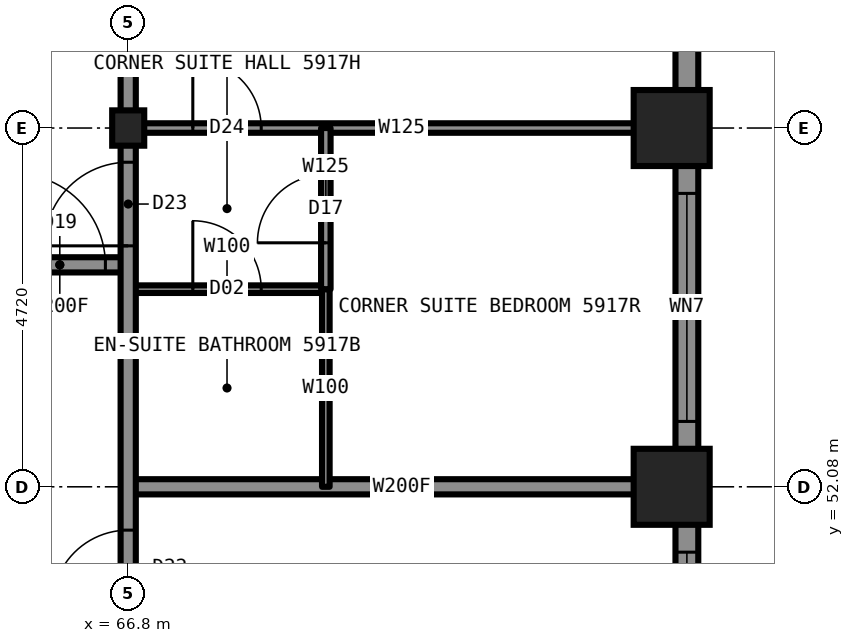
"""IFC4 building model, lengths in metres.
Left out: names, types, materials, properties, quantities, classifications, styles, units other than length and angle.
Written with IfcOpenShell. Run it as: python <this file> out.ifc"""

import sys

from ifc_helpers import new_model, si_unit, direction, frame, frame_2d, origin, origin_2d, place, context, subcontext, project, spatial, rectangle, i_section, extrude, element, fill, save


model = new_model("IFC4")
c1 = context("Model", 3, precision=1e-05, world=origin(), true_north=direction((0.0, 1.0)))
c2 = subcontext(c1, "Body", "Model", "MODEL_VIEW")
j1 = project(units=[si_unit("LENGTHUNIT", "METRE"), si_unit("PLANEANGLEUNIT", "RADIAN")], contexts=[c1])
p1 = place(None, origin())
s1 = spatial("IfcSite", under=j1, at=p1, CompositionType="ELEMENT")
p2 = place(p1, origin())
s2 = spatial("IfcBuilding", under=s1, at=p2, CompositionType="ELEMENT")
p3 = place(p2, frame((0.0, 0.0, 214.3)))
s3 = spatial("IfcBuildingStorey", under=s2, at=p3, CompositionType="ELEMENT", Elevation=214.3)
for number, where, z_axis, x_axis in (
    (1, (73.95, 52.08, 0.0), (0.0, 0.0, 1.0), (1.0, 0.0, 0.0)),
    (2, (73.95, 56.8, 0.0), (0.0, 0.0, 1.0), (1.0, 0.0, 0.0)),
):
    element("IfcColumn", number, at=place(p3, frame(where, z_axis=z_axis, x_axis=x_axis)), inside=s3, PredefinedType="COLUMN", context=c2, shape_type="SweptSolid", body=[
        extrude(i_section(OverallWidth=0.411, OverallDepth=0.434, WebThickness=0.036, FlangeThickness=0.057, at=origin_2d()), origin(), (0.0, 0.0, 1.0), 3.5),
    ])
p4 = place(p3, frame((66.8, 56.8, 0.0), z_axis=(0.0, 0.0, 1.0), x_axis=(1.0, 0.0, 0.0)))
e3 = element("IfcColumn", 3, at=p4, inside=s3, PredefinedType="COLUMN", context=c2, shape_type="SweptSolid", body=[
    extrude(i_section(OverallWidth=0.422, OverallDepth=0.465, WebThickness=0.045, FlangeThickness=0.073, at=origin_2d()), origin(), (0.0, 0.0, 1.0), 3.5),
])
p5 = place(p3, frame((65.0, 55.0, 0.0), z_axis=(0.0, 0.0, 1.0), x_axis=(1.0, 0.0, 0.0)))
e4 = element("IfcWall", 4, at=p5, inside=s3, PredefinedType="PARTITIONING", context=c2, shape_type="SweptSolid", body=[
    extrude(rectangle(XDim=1.8, YDim=0.2, at=frame_2d((0.9, 0.0))), origin(), (0.0, 0.0, 1.0), 3.33),
])
p6 = place(p5, frame((0.3, 0.0, 0.0)))
e5 = element("IfcOpeningElement", 5, at=p6, cuts=e4, PredefinedType="OPENING", context=c2, shape_type="SweptSolid", body=[
    extrude(rectangle(XDim=1.2, YDim=2.2, at=frame_2d((0.6, 1.1))), frame((0.0, 0.11, 0.0), z_axis=(0.0, -1.0, 0.0), x_axis=(1.0, 0.0, 0.0)), (0.0, 0.0, 1.0), 0.22),
])
p7 = place(p3, frame((66.8, 56.8, 0.0), z_axis=(0.0, 0.0, 1.0), x_axis=(1.0, 0.0, 0.0)))
e6 = element("IfcWall", 6, at=p7, inside=s3, PredefinedType="PARTITIONING", context=c2, shape_type="SweptSolid", body=[
    extrude(rectangle(XDim=7.2, YDim=0.125, at=frame_2d((3.6, 0.0))), origin(), (0.0, 0.0, 1.0), 2.573),
])
p8 = place(p7, frame((0.85, 0.0, 0.0)))
e7 = element("IfcOpeningElement", 7, at=p8, cuts=e6, PredefinedType="OPENING", context=c2, shape_type="SweptSolid", body=[
    extrude(rectangle(XDim=0.9, YDim=2.2, at=frame_2d((0.45, 1.1))), frame((0.0, 0.073, 0.0), z_axis=(0.0, -1.0, 0.0), x_axis=(1.0, 0.0, 0.0)), (0.0, 0.0, 1.0), 0.145),
])
p9 = place(p3, frame((66.8, 52.08, 0.0), z_axis=(0.0, 0.0, 1.0), x_axis=(1.0, 0.0, 0.0)))
e8 = element("IfcWall", 8, at=p9, inside=s3, PredefinedType="PARTITIONING", context=c2, shape_type="SweptSolid", body=[
    extrude(rectangle(XDim=7.2, YDim=0.2, at=frame_2d((3.6, 0.0))), origin(), (0.0, 0.0, 1.0), 2.573),
])
p10 = place(p3, frame((66.8, 54.68, 0.0), z_axis=(0.0, 0.0, 1.0), x_axis=(1.0, 0.0, 0.0)))
e9 = element("IfcWall", 9, at=p10, inside=s3, PredefinedType="PARTITIONING", context=c2, shape_type="SweptSolid", body=[
    extrude(rectangle(XDim=2.6, YDim=0.1, at=frame_2d((1.3, 0.0))), origin(), (0.0, 0.0, 1.0), 3.33),
])
p11 = place(p10, frame((0.85, 0.0, 0.0)))
e10 = element("IfcOpeningElement", 10, at=p11, cuts=e9, PredefinedType="OPENING", context=c2, shape_type="SweptSolid", body=[
    extrude(rectangle(XDim=0.9, YDim=2.1, at=frame_2d((0.45, 1.05))), frame((0.0, 0.06, 0.0), z_axis=(0.0, -1.0, 0.0), x_axis=(1.0, 0.0, 0.0)), (0.0, 0.0, 1.0), 0.12),
])
p12 = place(p3, frame((66.8, 33.2, 0.0), z_axis=(0.0, 0.0, 1.0), x_axis=(0.0, 1.0, 0.0)))
e11 = element("IfcWall", 11, at=p12, inside=s3, PredefinedType="PARTITIONING", context=c2, shape_type="SweptSolid", body=[
    extrude(rectangle(XDim=23.58, YDim=0.2, at=frame_2d((11.79, 0.0))), origin(), (0.0, 0.0, 1.0), 3.33),
])
p13 = place(p12, frame((5.12, 0.0, 0.0)))
e12 = element("IfcOpeningElement", 12, at=p13, cuts=e11, PredefinedType="OPENING", context=c2, shape_type="SweptSolid", body=[
    extrude(rectangle(XDim=1.0, YDim=2.2, at=frame_2d((0.5, 1.1))), frame((0.0, 0.11, 0.0), z_axis=(0.0, -1.0, 0.0), x_axis=(1.0, 0.0, 0.0)), (0.0, 0.0, 1.0), 0.22),
])
p14 = place(p12, frame((10.9, 0.0, 0.0)))
e13 = element("IfcOpeningElement", 13, at=p14, cuts=e11, PredefinedType="OPENING", context=c2, shape_type="SweptSolid", body=[
    extrude(rectangle(XDim=1.0, YDim=2.2, at=frame_2d((0.5, 1.1))), frame((0.0, 0.11, 0.0), z_axis=(0.0, -1.0, 0.0), x_axis=(1.0, 0.0, 0.0)), (0.0, 0.0, 1.0), 0.22),
])
p15 = place(p12, frame((17.31, 0.0, 0.0)))
e14 = element("IfcOpeningElement", 14, at=p15, cuts=e11, PredefinedType="OPENING", context=c2, shape_type="SweptSolid", body=[
    extrude(rectangle(XDim=1.0, YDim=2.2, at=frame_2d((0.5, 1.1))), frame((0.0, 0.11, 0.0), z_axis=(0.0, -1.0, 0.0), x_axis=(1.0, 0.0, 0.0)), (0.0, 0.0, 1.0), 0.22),
])
p16 = place(p12, frame((22.05, 0.0, 0.0)))
e15 = element("IfcOpeningElement", 15, at=p16, cuts=e11, PredefinedType="OPENING", context=c2, shape_type="SweptSolid", body=[
    extrude(rectangle(XDim=1.1, YDim=2.2, at=frame_2d((0.55, 1.1))), frame((0.0, 0.11, 0.0), z_axis=(0.0, -1.0, 0.0), x_axis=(1.0, 0.0, 0.0)), (0.0, 0.0, 1.0), 0.22),
])
p17 = place(p12, frame((0.65, 0.0, 0.0)))
e16 = element("IfcOpeningElement", 16, at=p17, cuts=e11, PredefinedType="OPENING", context=c2, shape_type="SweptSolid", body=[
    extrude(rectangle(XDim=1.1, YDim=2.2, at=frame_2d((0.55, 1.1))), frame((0.0, 0.11, 0.0), z_axis=(0.0, -1.0, 0.0), x_axis=(1.0, 0.0, 0.0)), (0.0, 0.0, 1.0), 0.22),
])
p18 = place(p3, frame((69.4, 52.08, 0.0), z_axis=(0.0, 0.0, 1.0), x_axis=(0.0, 1.0, 0.0)))
e17 = element("IfcWall", 17, at=p18, inside=s3, PredefinedType="PARTITIONING", context=c2, shape_type="SweptSolid", body=[
    extrude(rectangle(XDim=2.6, YDim=0.1, at=frame_2d((1.3, 0.0))), origin(), (0.0, 0.0, 1.0), 3.33),
])
p19 = place(p3, frame((69.4, 54.68, 0.0), z_axis=(0.0, 0.0, 1.0), x_axis=(0.0, 1.0, 0.0)))
e18 = element("IfcWall", 18, at=p19, inside=s3, PredefinedType="PARTITIONING", context=c2, shape_type="SweptSolid", body=[
    extrude(rectangle(XDim=2.12, YDim=0.125, at=frame_2d((1.06, 0.0))), origin(), (0.0, 0.0, 1.0), 3.33),
])
p20 = place(p19, frame((0.61, 0.0, 0.0)))
e19 = element("IfcOpeningElement", 19, at=p20, cuts=e18, PredefinedType="OPENING", context=c2, shape_type="SweptSolid", body=[
    extrude(rectangle(XDim=0.9, YDim=2.2, at=frame_2d((0.45, 1.1))), frame((0.0, 0.073, 0.0), z_axis=(0.0, -1.0, 0.0), x_axis=(1.0, 0.0, 0.0)), (0.0, 0.0, 1.0), 0.145),
])
p21 = place(p3, frame((74.15, 31.2, 0.0), z_axis=(0.0, 0.0, 1.0), x_axis=(0.0, 1.0, 0.0)))
e20 = element("IfcWall", 20, at=p21, inside=s3, PredefinedType="SOLIDWALL", context=c2, shape_type="SweptSolid", body=[
    extrude(rectangle(XDim=27.6, YDim=0.3, at=frame_2d((13.8, 0.0))), origin(), (0.0, 0.0, 1.0), 2.63),
])
p22 = place(p21, frame((2.86, 0.0, 0.3)))
e21 = element("IfcOpeningElement", 21, at=p22, cuts=e20, PredefinedType="OPENING", context=c2, shape_type="SweptSolid", body=[
    extrude(rectangle(XDim=3.0, YDim=2.0, at=frame_2d((1.5, 1.0))), frame((0.0, 0.16, 0.0), z_axis=(0.0, -1.0, 0.0), x_axis=(1.0, 0.0, 0.0)), (0.0, 0.0, 1.0), 0.32),
])
p23 = place(p21, frame((7.58, 0.0, 0.3)))
e22 = element("IfcOpeningElement", 22, at=p23, cuts=e20, PredefinedType="OPENING", context=c2, shape_type="SweptSolid", body=[
    extrude(rectangle(XDim=3.0, YDim=2.0, at=frame_2d((1.5, 1.0))), frame((0.0, 0.16, 0.0), z_axis=(0.0, -1.0, 0.0), x_axis=(1.0, 0.0, 0.0)), (0.0, 0.0, 1.0), 0.32),
])
p24 = place(p21, frame((12.3, 0.0, 0.3)))
e23 = element("IfcOpeningElement", 23, at=p24, cuts=e20, PredefinedType="OPENING", context=c2, shape_type="SweptSolid", body=[
    extrude(rectangle(XDim=3.0, YDim=2.0, at=frame_2d((1.5, 1.0))), frame((0.0, 0.16, 0.0), z_axis=(0.0, -1.0, 0.0), x_axis=(1.0, 0.0, 0.0)), (0.0, 0.0, 1.0), 0.32),
])
p25 = place(p21, frame((17.02, 0.0, 0.3)))
e24 = element("IfcOpeningElement", 24, at=p25, cuts=e20, PredefinedType="OPENING", context=c2, shape_type="SweptSolid", body=[
    extrude(rectangle(XDim=3.0, YDim=2.0, at=frame_2d((1.5, 1.0))), frame((0.0, 0.16, 0.0), z_axis=(0.0, -1.0, 0.0), x_axis=(1.0, 0.0, 0.0)), (0.0, 0.0, 1.0), 0.32),
])
p26 = place(p21, frame((21.74, 0.0, 0.3)))
e25 = element("IfcOpeningElement", 25, at=p26, cuts=e20, PredefinedType="OPENING", context=c2, shape_type="SweptSolid", body=[
    extrude(rectangle(XDim=3.0, YDim=2.0, at=frame_2d((1.5, 1.0))), frame((0.0, 0.16, 0.0), z_axis=(0.0, -1.0, 0.0), x_axis=(1.0, 0.0, 0.0)), (0.0, 0.0, 1.0), 0.32),
])
p27 = place(p3, frame((66.8, 56.78, 0.0), z_axis=(0.0, 0.0, 1.0), x_axis=(0.0, 1.0, 0.0)))
e26 = element("IfcWall", 26, at=p27, inside=s3, PredefinedType="PARTITIONING", context=c2, shape_type="SweptSolid", body=[
    extrude(rectangle(XDim=2.82, YDim=0.2, at=frame_2d((1.41, 0.0))), origin(), (0.0, 0.0, 1.0), 2.573),
])
p28 = place(p6, origin())
e27 = element("IfcDoor", 27, at=p28, inside=s3, OperationType="SINGLE_SWING_LEFT", PredefinedType="DOOR", context=c2, shape_type="SweptSolid", body=[
    extrude(rectangle(XDim=1.2, YDim=2.2, at=frame_2d((0.6, 1.1))), frame((0.0, 0.025, 0.0), z_axis=(0.0, -1.0, 0.0), x_axis=(1.0, 0.0, 0.0)), (0.0, 0.0, 1.0), 0.05),
])
fill(e5, e27)
p29 = place(p15, origin())
e28 = element("IfcDoor", 28, at=p29, inside=s3, OperationType="SINGLE_SWING_LEFT", PredefinedType="DOOR", context=c2, shape_type="SweptSolid", body=[
    extrude(rectangle(XDim=1.0, YDim=2.2, at=frame_2d((0.5, 1.1))), frame((0.0, 0.025, 0.0), z_axis=(0.0, -1.0, 0.0), x_axis=(1.0, 0.0, 0.0)), (0.0, 0.0, 1.0), 0.05),
])
fill(e14, e28)
p30 = place(p8, origin())
e29 = element("IfcDoor", 29, at=p30, inside=s3, OperationType="SINGLE_SWING_LEFT", PredefinedType="DOOR", context=c2, shape_type="SweptSolid", body=[
    extrude(rectangle(XDim=0.9, YDim=2.2, at=frame_2d((0.45, 1.1))), frame((0.0, 0.025, 0.0), z_axis=(0.0, -1.0, 0.0), x_axis=(1.0, 0.0, 0.0)), (0.0, 0.0, 1.0), 0.05),
])
fill(e7, e29)
p31 = place(p11, origin())
e30 = element("IfcDoor", 30, at=p31, inside=s3, OperationType="SINGLE_SWING_RIGHT", PredefinedType="DOOR", context=c2, shape_type="SweptSolid", body=[
    extrude(rectangle(XDim=0.9, YDim=2.1, at=frame_2d((0.45, 1.05))), frame((0.0, 0.025, 0.0), z_axis=(0.0, -1.0, 0.0), x_axis=(1.0, 0.0, 0.0)), (0.0, 0.0, 1.0), 0.05),
])
fill(e10, e30)
p32 = place(p16, origin())
e31 = element("IfcDoor", 31, at=p32, inside=s3, OperationType="SINGLE_SWING_LEFT", PredefinedType="DOOR", context=c2, shape_type="SweptSolid", body=[
    extrude(rectangle(XDim=1.1, YDim=2.2, at=frame_2d((0.55, 1.1))), frame((0.0, 0.025, 0.0), z_axis=(0.0, -1.0, 0.0), x_axis=(1.0, 0.0, 0.0)), (0.0, 0.0, 1.0), 0.05),
])
fill(e15, e31)
p33 = place(p20, origin())
e32 = element("IfcDoor", 32, at=p33, inside=s3, OperationType="SINGLE_SWING_LEFT", PredefinedType="DOOR", context=c2, shape_type="SweptSolid", body=[
    extrude(rectangle(XDim=0.9, YDim=2.2, at=frame_2d((0.45, 1.1))), frame((0.0, 0.025, 0.0), z_axis=(0.0, -1.0, 0.0), x_axis=(1.0, 0.0, 0.0)), (0.0, 0.0, 1.0), 0.05),
])
fill(e19, e32)
p34 = place(p25, origin())
e33 = element("IfcWindow", 33, at=p34, inside=s3, PartitioningType="SINGLE_PANEL", PredefinedType="WINDOW", context=c2, shape_type="SweptSolid", body=[
    extrude(rectangle(XDim=3.0, YDim=2.0, at=frame_2d((1.5, 1.0))), frame((0.0, 0.13, 0.0), z_axis=(0.0, -1.0, 0.0), x_axis=(1.0, 0.0, 0.0)), (0.0, 0.0, 1.0), 0.06),
])
fill(e24, e33)
p35 = place(p26, origin())
e34 = element("IfcWindow", 34, at=p35, inside=s3, PartitioningType="SINGLE_PANEL", PredefinedType="WINDOW", context=c2, shape_type="SweptSolid", body=[
    extrude(rectangle(XDim=3.0, YDim=2.0, at=frame_2d((1.5, 1.0))), frame((0.0, 0.13, 0.0), z_axis=(0.0, -1.0, 0.0), x_axis=(1.0, 0.0, 0.0)), (0.0, 0.0, 1.0), 0.06),
])
fill(e25, e34)
save(model, sys.argv[1])
